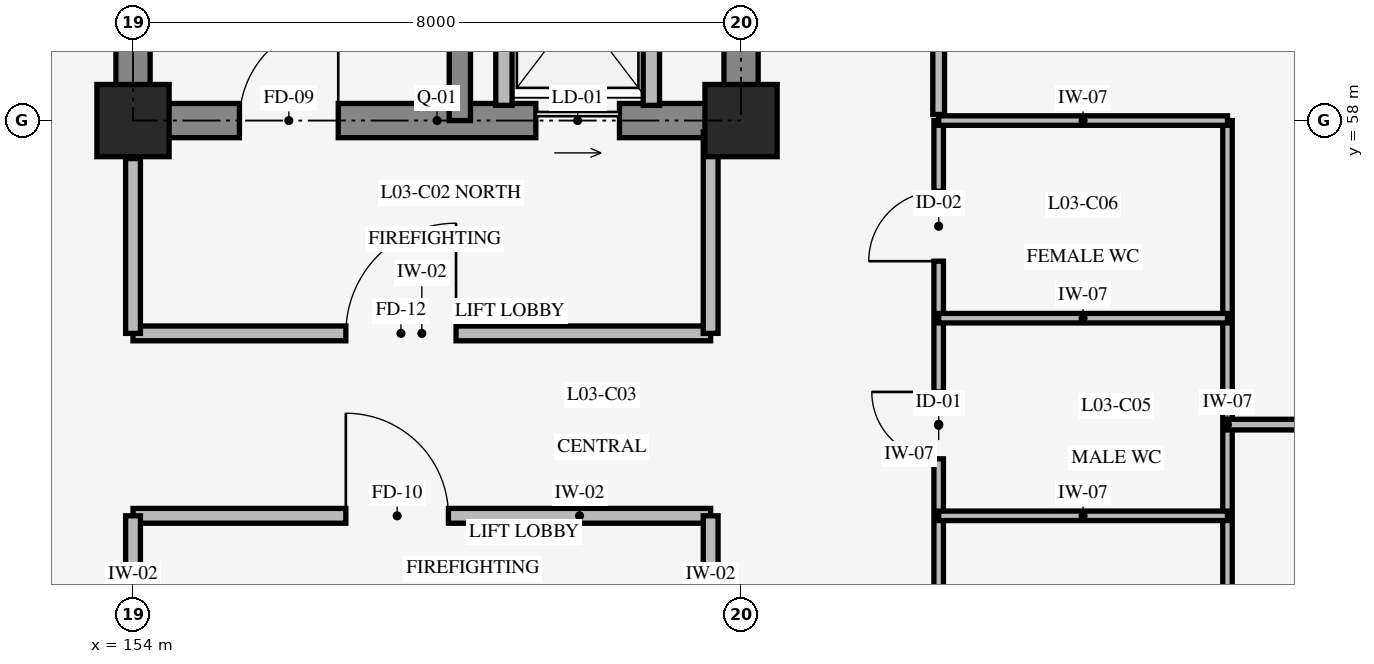
"""IFC4 building model, lengths in metres.
Left out: names, types, materials, properties, quantities, classifications, styles, units other than length and angle.
Written with IfcOpenShell. Run it as: python <this file> out.ifc"""

import sys

from ifc_helpers import new_model, si_unit, direction, frame, frame_2d, origin, origin_2d, place, context, subcontext, project, spatial, rectangle, extrude, element, fill, save


model = new_model("IFC4")
c1 = context("Model", 3, precision=1e-05, world=origin(), true_north=direction((0.0, 1.0)))
c2 = subcontext(c1, "Body", "Model", "MODEL_VIEW")
j1 = project(units=[si_unit("LENGTHUNIT", "METRE"), si_unit("PLANEANGLEUNIT", "RADIAN")], contexts=[c1])
p1 = place(None, origin())
s1 = spatial("IfcSite", under=j1, at=p1, CompositionType="ELEMENT")
p2 = place(p1, origin())
s2 = spatial("IfcBuilding", under=s1, at=p2, CompositionType="ELEMENT")
p3 = place(p2, frame((0.0, 0.0, 10.2)))
s3 = spatial("IfcBuildingStorey", under=s2, at=p3, CompositionType="ELEMENT", Elevation=10.2)
p4 = place(p3, frame((154.0, 58.0, 0.0), z_axis=(0.0, 0.0, 1.0), x_axis=(1.0, 0.0, 0.0)))
e1 = element("IfcWall", 1, at=p4, inside=s3, PredefinedType="SHEAR", context=c2, shape_type="SweptSolid", body=[
    extrude(rectangle(XDim=8.0, YDim=0.45, at=frame_2d((4.0, 0.0))), origin(), (0.0, 0.0, 1.0), 4.55),
])
p5 = place(p4, frame((1.4, 0.0, 0.0)))
e2 = element("IfcOpeningElement", 2, at=p5, cuts=e1, PredefinedType="OPENING", context=c2, shape_type="SweptSolid", body=[
    extrude(rectangle(XDim=1.3, YDim=2.15, at=frame_2d((0.65, 1.075))), frame((0.0, 0.235, 0.0), z_axis=(0.0, -1.0, 0.0), x_axis=(1.0, 0.0, 0.0)), (0.0, 0.0, 1.0), 0.47),
])
p6 = place(p4, frame((5.3, 0.0, 0.0)))
e3 = element("IfcOpeningElement", 3, at=p6, cuts=e1, PredefinedType="OPENING", context=c2, shape_type="SweptSolid", body=[
    extrude(rectangle(XDim=1.1, YDim=2.2, at=frame_2d((0.55, 1.1))), frame((0.0, 0.235, 0.0), z_axis=(0.0, -1.0, 0.0), x_axis=(1.0, 0.0, 0.0)), (0.0, 0.0, 1.0), 0.47),
])
p7 = place(p3, frame((162.0, 58.0, 0.0), z_axis=(0.0, 0.0, 1.0), x_axis=(0.0, 1.0, 0.0)))
e4 = element("IfcWall", 4, at=p7, inside=s3, PredefinedType="SHEAR", context=c2, shape_type="SweptSolid", body=[
    extrude(rectangle(XDim=8.0, YDim=0.45, at=frame_2d((4.0, 0.0))), origin(), (0.0, 0.0, 1.0), 4.55),
])
p8 = place(p7, frame((3.275, 0.0, 0.0)))
e5 = element("IfcOpeningElement", 5, at=p8, cuts=e4, PredefinedType="OPENING", context=c2, shape_type="SweptSolid", body=[
    extrude(rectangle(XDim=1.05, YDim=2.2, at=frame_2d((0.525, 1.1))), frame((0.0, 0.235, 0.0), z_axis=(0.0, -1.0, 0.0), x_axis=(1.0, 0.0, 0.0)), (0.0, 0.0, 1.0), 0.47),
])
p9 = place(p7, frame((5.45, 0.0, 0.0)))
e6 = element("IfcOpeningElement", 6, at=p9, cuts=e4, PredefinedType="OPENING", context=c2, shape_type="SweptSolid", body=[
    extrude(rectangle(XDim=1.4, YDim=2.3, at=frame_2d((0.7, 1.15))), frame((0.0, 0.235, 0.0), z_axis=(0.0, -1.0, 0.0), x_axis=(1.0, 0.0, 0.0)), (0.0, 0.0, 1.0), 0.47),
])
p10 = place(p3, frame((154.0, 66.0, 0.0), z_axis=(0.0, 0.0, 1.0), x_axis=(0.0, -1.0, 0.0)))
e7 = element("IfcWall", 7, at=p10, inside=s3, PredefinedType="SHEAR", context=c2, shape_type="SweptSolid", body=[
    extrude(rectangle(XDim=8.0, YDim=0.45, at=frame_2d((4.0, 0.0))), origin(), (0.0, 0.0, 1.0), 4.55),
])
p11 = place(p3, frame((158.3, 58.0, 0.0), z_axis=(0.0, 0.0, 1.0), x_axis=(0.0, 1.0, 0.0)))
e8 = element("IfcWall", 8, at=p11, inside=s3, PredefinedType="SHEAR", context=c2, shape_type="SweptSolid", body=[
    extrude(rectangle(XDim=8.0, YDim=0.28, at=frame_2d((4.0, 0.0))), origin(), (0.0, 0.0, 1.0), 4.55),
])
for number, where, z_axis, x_axis in (
    (9, (154.0, 58.0, 0.0), (0.0, 0.0, 1.0), (1.0, 0.0, 0.0)),
    (10, (162.0, 58.0, 0.0), (0.0, 0.0, 1.0), (1.0, 0.0, 0.0)),
):
    element("IfcColumn", number, at=place(p3, frame(where, z_axis=z_axis, x_axis=x_axis)), inside=s3, PredefinedType="COLUMN", context=c2, shape_type="SweptSolid", body=[
        extrude(rectangle(XDim=0.95, YDim=0.95, at=origin_2d()), origin(), (0.0, 0.0, 1.0), 4.8),
    ])
for number, where, z_axis, x_axis in (
    (11, (160.82, 58.2, 0.0), (0.0, 0.0, 1.0), (0.0, 1.0, 0.0)),
    (12, (158.88, 58.2, 0.0), (0.0, 0.0, 1.0), (0.0, 1.0, 0.0)),
):
    element("IfcWall", number, at=place(p3, frame(where, z_axis=z_axis, x_axis=x_axis)), inside=s3, PredefinedType="STANDARD", context=c2, shape_type="SweptSolid", body=[
        extrude(rectangle(XDim=2.55, YDim=0.215, at=frame_2d((1.275, 0.0))), origin(), (0.0, 0.0, 1.0), 4.5),
    ])
p12 = place(p3, frame((154.0, 52.8, 0.0), z_axis=(0.0, 0.0, 1.0), x_axis=(1.0, 0.0, 0.0)))
e13 = element("IfcWall", 13, at=p12, inside=s3, PredefinedType="STANDARD", context=c2, shape_type="SweptSolid", body=[
    extrude(rectangle(XDim=7.6, YDim=0.195, at=frame_2d((3.8, 0.0))), origin(), (0.0, 0.0, 1.0), 4.5),
])
p13 = place(p12, frame((2.8, 0.0, 0.0)))
e14 = element("IfcOpeningElement", 14, at=p13, cuts=e13, PredefinedType="OPENING", context=c2, shape_type="SweptSolid", body=[
    extrude(rectangle(XDim=1.35, YDim=2.15, at=frame_2d((0.675, 1.075))), frame((0.0, 0.107, 0.0), z_axis=(0.0, -1.0, 0.0), x_axis=(1.0, 0.0, 0.0)), (0.0, 0.0, 1.0), 0.215),
])
p14 = place(p3, frame((161.6, 50.15, 0.0), z_axis=(0.0, 0.0, 1.0), x_axis=(0.0, 1.0, 0.0)))
e15 = element("IfcWall", 15, at=p14, inside=s3, PredefinedType="STANDARD", context=c2, shape_type="SweptSolid", body=[
    extrude(rectangle(XDim=2.65, YDim=0.195, at=frame_2d((1.325, 0.0))), origin(), (0.0, 0.0, 1.0), 3.68),
])
p15 = place(p3, frame((154.0, 50.5, 0.0), z_axis=(0.0, 0.0, 1.0), x_axis=(0.0, 1.0, 0.0)))
e16 = element("IfcWall", 16, at=p15, inside=s3, PredefinedType="STANDARD", context=c2, shape_type="SweptSolid", body=[
    extrude(rectangle(XDim=2.3, YDim=0.195, at=frame_2d((1.15, 0.0))), origin(), (0.0, 0.0, 1.0), 3.68),
])
p16 = place(p3, frame((154.0, 55.2, 0.0), z_axis=(0.0, 0.0, 1.0), x_axis=(1.0, 0.0, 0.0)))
e17 = element("IfcWall", 17, at=p16, inside=s3, PredefinedType="STANDARD", context=c2, shape_type="SweptSolid", body=[
    extrude(rectangle(XDim=7.6, YDim=0.195, at=frame_2d((3.8, 0.0))), origin(), (0.0, 0.0, 1.0), 4.5),
])
p17 = place(p16, frame((2.8, 0.0, 0.0)))
e18 = element("IfcOpeningElement", 18, at=p17, cuts=e17, PredefinedType="OPENING", context=c2, shape_type="SweptSolid", body=[
    extrude(rectangle(XDim=1.45, YDim=2.2, at=frame_2d((0.725, 1.1))), frame((0.0, 0.107, 0.0), z_axis=(0.0, -1.0, 0.0), x_axis=(1.0, 0.0, 0.0)), (0.0, 0.0, 1.0), 0.215),
])
p18 = place(p3, frame((161.6, 55.2, 0.0), z_axis=(0.0, 0.0, 1.0), x_axis=(0.0, 1.0, 0.0)))
e19 = element("IfcWall", 19, at=p18, inside=s3, PredefinedType="STANDARD", context=c2, shape_type="SweptSolid", body=[
    extrude(rectangle(XDim=2.65, YDim=0.195, at=frame_2d((1.325, 0.0))), origin(), (0.0, 0.0, 1.0), 3.68),
])
p19 = place(p3, frame((154.0, 55.2, 0.0), z_axis=(0.0, 0.0, 1.0), x_axis=(0.0, 1.0, 0.0)))
e20 = element("IfcWall", 20, at=p19, inside=s3, PredefinedType="STANDARD", context=c2, shape_type="SweptSolid", body=[
    extrude(rectangle(XDim=2.3, YDim=0.195, at=frame_2d((1.15, 0.0))), origin(), (0.0, 0.0, 1.0), 3.68),
])
p20 = place(p3, frame((164.6, 50.0, 0.0), z_axis=(0.0, 0.0, 1.0), x_axis=(0.0, 1.0, 0.0)))
e21 = element("IfcWall", 21, at=p20, inside=s3, PredefinedType="STANDARD", context=c2, shape_type="SweptSolid", body=[
    extrude(rectangle(XDim=8.0, YDim=0.125, at=frame_2d((4.0, 0.0))), origin(), (0.0, 0.0, 1.0), 4.5),
])
p21 = place(p20, frame((0.9, 0.0, 0.0)))
e22 = element("IfcOpeningElement", 22, at=p21, cuts=e21, PredefinedType="OPENING", context=c2, shape_type="SweptSolid", body=[
    extrude(rectangle(XDim=0.96, YDim=2.08, at=frame_2d((0.48, 1.04))), frame((0.0, 0.073, 0.0), z_axis=(0.0, -1.0, 0.0), x_axis=(1.0, 0.0, 0.0)), (0.0, 0.0, 1.0), 0.145),
])
p22 = place(p20, frame((3.55, 0.0, 0.0)))
e23 = element("IfcOpeningElement", 23, at=p22, cuts=e21, PredefinedType="OPENING", context=c2, shape_type="SweptSolid", body=[
    extrude(rectangle(XDim=0.88, YDim=2.05, at=frame_2d((0.44, 1.025))), frame((0.0, 0.073, 0.0), z_axis=(0.0, -1.0, 0.0), x_axis=(1.0, 0.0, 0.0)), (0.0, 0.0, 1.0), 0.145),
])
p23 = place(p20, frame((6.15, 0.0, 0.0)))
e24 = element("IfcOpeningElement", 24, at=p23, cuts=e21, PredefinedType="OPENING", context=c2, shape_type="SweptSolid", body=[
    extrude(rectangle(XDim=0.92, YDim=2.05, at=frame_2d((0.46, 1.025))), frame((0.0, 0.073, 0.0), z_axis=(0.0, -1.0, 0.0), x_axis=(1.0, 0.0, 0.0)), (0.0, 0.0, 1.0), 0.145),
])
p24 = place(p3, frame((168.4, 50.0, 0.0), z_axis=(0.0, 0.0, 1.0), x_axis=(0.0, 1.0, 0.0)))
e25 = element("IfcWall", 25, at=p24, inside=s3, PredefinedType="STANDARD", context=c2, shape_type="SweptSolid", body=[
    extrude(rectangle(XDim=8.0, YDim=0.125, at=frame_2d((4.0, 0.0))), origin(), (0.0, 0.0, 1.0), 4.5),
])
for number, where, z_axis, x_axis in (
    (26, (164.6, 52.8, 0.0), (0.0, 0.0, 1.0), (1.0, 0.0, 0.0)),
    (27, (164.6, 55.4, 0.0), (0.0, 0.0, 1.0), (1.0, 0.0, 0.0)),
):
    element("IfcWall", number, at=place(p3, frame(where, z_axis=z_axis, x_axis=x_axis)), inside=s3, PredefinedType="STANDARD", context=c2, shape_type="SweptSolid", body=[
        extrude(rectangle(XDim=3.8, YDim=0.125, at=frame_2d((1.9, 0.0))), origin(), (0.0, 0.0, 1.0), 4.5),
    ])
p25 = place(p3, frame((164.6, 58.0, 0.0), z_axis=(0.0, 0.0, 1.0), x_axis=(1.0, 0.0, 0.0)))
e28 = element("IfcWall", 28, at=p25, inside=s3, PredefinedType="STANDARD", context=c2, shape_type="SweptSolid", body=[
    extrude(rectangle(XDim=3.8, YDim=0.125, at=frame_2d((1.9, 0.0))), origin(), (0.0, 0.0, 1.0), 3.63),
])
p26 = place(p3, frame((168.4, 54.0, 0.0), z_axis=(0.0, 0.0, 1.0), x_axis=(1.0, 0.0, 0.0)))
e29 = element("IfcWall", 29, at=p26, inside=s3, PredefinedType="STANDARD", context=c2, shape_type="SweptSolid", body=[
    extrude(rectangle(XDim=8.96, YDim=0.14, at=frame_2d((4.48, 0.0))), origin(), (0.0, 0.0, 1.0), 4.5),
])
p27 = place(p26, frame((3.9, 0.0, 0.0)))
e30 = element("IfcOpeningElement", 30, at=p27, cuts=e29, PredefinedType="OPENING", context=c2, shape_type="SweptSolid", body=[
    extrude(rectangle(XDim=1.16, YDim=2.12, at=frame_2d((0.58, 1.06))), frame((0.0, 0.08, 0.0), z_axis=(0.0, -1.0, 0.0), x_axis=(1.0, 0.0, 0.0)), (0.0, 0.0, 1.0), 0.16),
])
p28 = place(p3, frame((164.6, 58.08, 0.0), z_axis=(0.0, 0.0, 1.0), x_axis=(0.0, 1.0, 0.0)))
e31 = element("IfcWall", 31, at=p28, inside=s3, PredefinedType="STANDARD", context=c2, shape_type="SweptSolid", body=[
    extrude(rectangle(XDim=15.8, YDim=0.155, at=frame_2d((7.9, 0.0))), origin(), (0.0, 0.0, 1.0), 4.5),
])
p29 = place(p28, frame((7.25, 0.0, 0.0)))
e32 = element("IfcOpeningElement", 32, at=p29, cuts=e31, PredefinedType="OPENING", context=c2, shape_type="SweptSolid", body=[
    extrude(rectangle(XDim=1.3, YDim=2.15, at=frame_2d((0.65, 1.075))), frame((0.0, 0.087, 0.0), z_axis=(0.0, -1.0, 0.0), x_axis=(1.0, 0.0, 0.0)), (0.0, 0.0, 1.0), 0.175),
])
p30 = place(p5, origin())
e33 = element("IfcDoor", 33, at=p30, inside=s3, OperationType="SINGLE_SWING_RIGHT", PredefinedType="DOOR", context=c2, shape_type="SweptSolid", body=[
    extrude(rectangle(XDim=1.3, YDim=2.15, at=frame_2d((0.65, 1.075))), frame((0.0, 0.025, 0.0), z_axis=(0.0, -1.0, 0.0), x_axis=(1.0, 0.0, 0.0)), (0.0, 0.0, 1.0), 0.05),
])
fill(e2, e33)
p31 = place(p6, origin())
e34 = element("IfcDoor", 34, at=p31, inside=s3, OperationType="SLIDING_TO_RIGHT", PredefinedType="DOOR", context=c2, shape_type="SweptSolid", body=[
    extrude(rectangle(XDim=1.1, YDim=2.2, at=frame_2d((0.55, 1.1))), frame((0.0, 0.025, 0.0), z_axis=(0.0, -1.0, 0.0), x_axis=(1.0, 0.0, 0.0)), (0.0, 0.0, 1.0), 0.05),
])
fill(e3, e34)
p32 = place(p13, origin())
e35 = element("IfcDoor", 35, at=p32, inside=s3, OperationType="SINGLE_SWING_LEFT", PredefinedType="DOOR", context=c2, shape_type="SweptSolid", body=[
    extrude(rectangle(XDim=1.35, YDim=2.15, at=frame_2d((0.675, 1.075))), frame((0.0, 0.025, 0.0), z_axis=(0.0, -1.0, 0.0), x_axis=(1.0, 0.0, 0.0)), (0.0, 0.0, 1.0), 0.05),
])
fill(e14, e35)
p33 = place(p17, origin())
e36 = element("IfcDoor", 36, at=p33, inside=s3, OperationType="SINGLE_SWING_RIGHT", PredefinedType="DOOR", context=c2, shape_type="SweptSolid", body=[
    extrude(rectangle(XDim=1.45, YDim=2.2, at=frame_2d((0.725, 1.1))), frame((0.0, 0.025, 0.0), z_axis=(0.0, -1.0, 0.0), x_axis=(1.0, 0.0, 0.0)), (0.0, 0.0, 1.0), 0.05),
])
fill(e18, e36)
p34 = place(p22, origin())
e37 = element("IfcDoor", 37, at=p34, inside=s3, OperationType="SINGLE_SWING_RIGHT", PredefinedType="DOOR", context=c2, shape_type="SweptSolid", body=[
    extrude(rectangle(XDim=0.88, YDim=2.05, at=frame_2d((0.44, 1.025))), frame((0.0, 0.025, 0.0), z_axis=(0.0, -1.0, 0.0), x_axis=(1.0, 0.0, 0.0)), (0.0, 0.0, 1.0), 0.05),
])
fill(e23, e37)
p35 = place(p23, origin())
e38 = element("IfcDoor", 38, at=p35, inside=s3, OperationType="SINGLE_SWING_LEFT", PredefinedType="DOOR", context=c2, shape_type="SweptSolid", body=[
    extrude(rectangle(XDim=0.92, YDim=2.05, at=frame_2d((0.46, 1.025))), frame((0.0, 0.025, 0.0), z_axis=(0.0, -1.0, 0.0), x_axis=(1.0, 0.0, 0.0)), (0.0, 0.0, 1.0), 0.05),
])
fill(e24, e38)
save(model, sys.argv[1])
